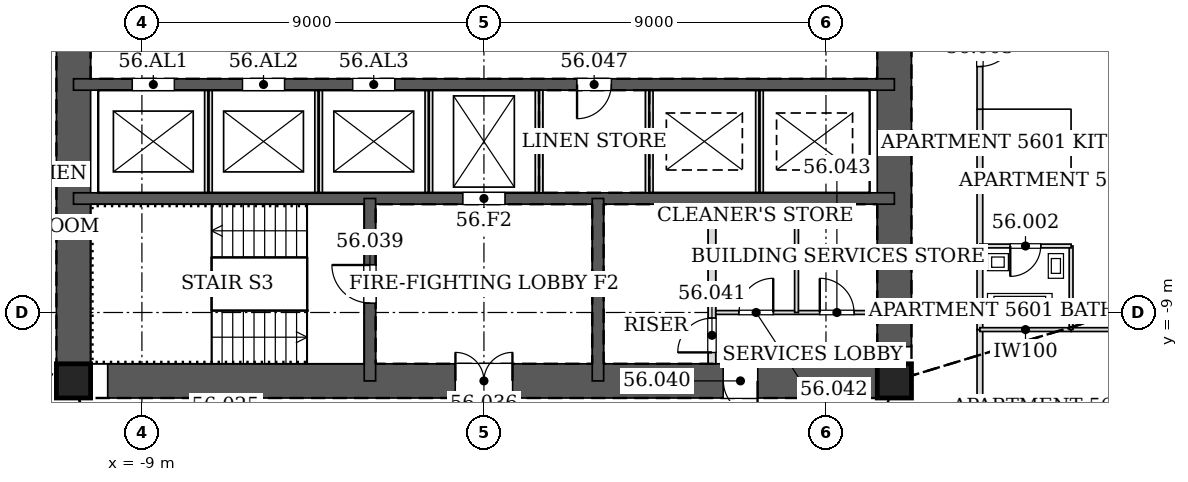
"""IFC4 building model, lengths in metres.
Left out: names, types, materials, properties, quantities, classifications, styles, units other than length and angle.
Written with IfcOpenShell. Run it as: python <this file> out.ifc"""

import sys

from ifc_helpers import new_model, si_unit, direction, frame, frame_2d, origin, origin_2d, place, context, subcontext, project, spatial, rectangle, hollow_rectangle, extrude, element, fill, save


model = new_model("IFC4")
c1 = context("Model", 3, precision=1e-05, world=origin(), true_north=direction((0.0, 1.0)))
c2 = subcontext(c1, "Body", "Model", "MODEL_VIEW")
j1 = project(units=[si_unit("LENGTHUNIT", "METRE"), si_unit("PLANEANGLEUNIT", "RADIAN")], contexts=[c1])
p1 = place(None, origin())
s1 = spatial("IfcSite", under=j1, at=p1, CompositionType="ELEMENT")
p2 = place(p1, origin())
s2 = spatial("IfcBuilding", under=s1, at=p2, CompositionType="ELEMENT")
p3 = place(p2, frame((0.0, 0.0, 238.0)))
s3 = spatial("IfcBuildingStorey", under=s2, at=p3, CompositionType="ELEMENT", Elevation=238.0)
for number, where, z_axis, x_axis in (
    (1, (-10.8, -10.8, 0.0), (0.0, 0.0, 1.0), (1.0, 0.0, 0.0)),
    (2, (10.8, -10.8, 0.0), (0.0, 0.0, 1.0), (1.0, 0.0, 0.0)),
):
    element("IfcColumn", number, at=place(p3, frame(where, z_axis=z_axis, x_axis=x_axis)), inside=s3, PredefinedType="COLUMN", context=c2, shape_type="SweptSolid", body=[
        extrude(hollow_rectangle(XDim=0.9, YDim=0.9, WallThickness=0.04, at=origin_2d()), origin(), (0.0, 0.0, 1.0), 3.4),
    ])
p4 = place(p3, frame((-10.8, -10.8, 0.0), z_axis=(0.0, 0.0, 1.0), x_axis=(1.0, 0.0, 0.0)))
e3 = element("IfcWall", 3, at=p4, inside=s3, PredefinedType="SOLIDWALL", context=c2, shape_type="SweptSolid", body=[
    extrude(rectangle(XDim=21.6, YDim=0.9, at=frame_2d((10.8, 0.0))), origin(), (0.0, 0.0, 1.0), 3.4),
])
p5 = place(p4, frame((10.05, 0.0, 0.0)))
e4 = element("IfcOpeningElement", 4, at=p5, cuts=e3, PredefinedType="OPENING", context=c2, shape_type="SweptSolid", body=[
    extrude(rectangle(XDim=1.5, YDim=2.1, at=frame_2d((0.75, 1.05))), frame((0.0, 0.46, 0.0), z_axis=(0.0, -1.0, 0.0), x_axis=(1.0, 0.0, 0.0)), (0.0, 0.0, 1.0), 0.92),
])
p6 = place(p4, frame((17.1, 0.0, 0.0)))
e5 = element("IfcOpeningElement", 5, at=p6, cuts=e3, PredefinedType="OPENING", context=c2, shape_type="SweptSolid", body=[
    extrude(rectangle(XDim=0.9, YDim=2.1, at=frame_2d((0.45, 1.05))), frame((0.0, 0.46, 0.0), z_axis=(0.0, -1.0, 0.0), x_axis=(1.0, 0.0, 0.0)), (0.0, 0.0, 1.0), 0.92),
])
p7 = place(p3, frame((10.8, -10.8, 0.0), z_axis=(0.0, 0.0, 1.0), x_axis=(0.0, 1.0, 0.0)))
e6 = element("IfcWall", 6, at=p7, inside=s3, PredefinedType="SOLIDWALL", context=c2, shape_type="SweptSolid", body=[
    extrude(rectangle(XDim=21.6, YDim=0.9, at=frame_2d((10.8, 0.0))), origin(), (0.0, 0.0, 1.0), 3.4),
])
p8 = place(p7, frame((11.7, 0.0, 0.0)))
e7 = element("IfcOpeningElement", 7, at=p8, cuts=e6, PredefinedType="OPENING", context=c2, shape_type="SweptSolid", body=[
    extrude(rectangle(XDim=1.2, YDim=2.1, at=frame_2d((0.6, 1.05))), frame((0.0, 0.46, 0.0), z_axis=(0.0, -1.0, 0.0), x_axis=(1.0, 0.0, 0.0)), (0.0, 0.0, 1.0), 0.92),
])
p9 = place(p7, frame((8.7, 0.0, 0.0)))
e8 = element("IfcOpeningElement", 8, at=p9, cuts=e6, PredefinedType="OPENING", context=c2, shape_type="SweptSolid", body=[
    extrude(rectangle(XDim=1.2, YDim=2.1, at=frame_2d((0.6, 1.05))), frame((0.0, 0.46, 0.0), z_axis=(0.0, -1.0, 0.0), x_axis=(1.0, 0.0, 0.0)), (0.0, 0.0, 1.0), 0.92),
])
p10 = place(p3, frame((-10.8, 10.8, 0.0), z_axis=(0.0, 0.0, 1.0), x_axis=(0.0, -1.0, 0.0)))
e9 = element("IfcWall", 9, at=p10, inside=s3, PredefinedType="SOLIDWALL", context=c2, shape_type="SweptSolid", body=[
    extrude(rectangle(XDim=21.6, YDim=0.9, at=frame_2d((10.8, 0.0))), origin(), (0.0, 0.0, 1.0), 3.4),
])
p11 = place(p10, frame((8.7, 0.0, 0.0)))
e10 = element("IfcOpeningElement", 10, at=p11, cuts=e9, PredefinedType="OPENING", context=c2, shape_type="SweptSolid", body=[
    extrude(rectangle(XDim=1.2, YDim=2.1, at=frame_2d((0.6, 1.05))), frame((0.0, 0.46, 0.0), z_axis=(0.0, -1.0, 0.0), x_axis=(1.0, 0.0, 0.0)), (0.0, 0.0, 1.0), 0.92),
])
p12 = place(p10, frame((11.7, 0.0, 0.0)))
e11 = element("IfcOpeningElement", 11, at=p12, cuts=e9, PredefinedType="OPENING", context=c2, shape_type="SweptSolid", body=[
    extrude(rectangle(XDim=1.2, YDim=2.1, at=frame_2d((0.6, 1.05))), frame((0.0, 0.46, 0.0), z_axis=(0.0, -1.0, 0.0), x_axis=(1.0, 0.0, 0.0)), (0.0, 0.0, 1.0), 0.92),
])
p13 = place(p3, frame((-10.8, -3.0, 0.0), z_axis=(0.0, 0.0, 1.0), x_axis=(1.0, 0.0, 0.0)))
e12 = element("IfcWall", 12, at=p13, inside=s3, PredefinedType="SOLIDWALL", context=c2, shape_type="SweptSolid", body=[
    extrude(rectangle(XDim=21.6, YDim=0.3, at=frame_2d((10.8, 0.0))), origin(), (0.0, 0.0, 1.0), 3.4),
])
p14 = place(p13, frame((13.25, 0.0, 0.0)))
e13 = element("IfcOpeningElement", 13, at=p14, cuts=e12, PredefinedType="OPENING", context=c2, shape_type="SweptSolid", body=[
    extrude(rectangle(XDim=0.9, YDim=2.1, at=frame_2d((0.45, 1.05))), frame((0.0, 0.16, 0.0), z_axis=(0.0, -1.0, 0.0), x_axis=(1.0, 0.0, 0.0)), (0.0, 0.0, 1.0), 0.32),
])
p15 = place(p13, frame((1.55, 0.0, 0.0)))
e14 = element("IfcOpeningElement", 14, at=p15, cuts=e12, PredefinedType="OPENING", context=c2, shape_type="SweptSolid", body=[
    extrude(rectangle(XDim=1.1, YDim=2.1, at=frame_2d((0.55, 1.05))), frame((0.0, 0.16, 0.0), z_axis=(0.0, -1.0, 0.0), x_axis=(1.0, 0.0, 0.0)), (0.0, 0.0, 1.0), 0.32),
])
p16 = place(p13, frame((4.45, 0.0, 0.0)))
e15 = element("IfcOpeningElement", 15, at=p16, cuts=e12, PredefinedType="OPENING", context=c2, shape_type="SweptSolid", body=[
    extrude(rectangle(XDim=1.1, YDim=2.1, at=frame_2d((0.55, 1.05))), frame((0.0, 0.16, 0.0), z_axis=(0.0, -1.0, 0.0), x_axis=(1.0, 0.0, 0.0)), (0.0, 0.0, 1.0), 0.32),
])
p17 = place(p13, frame((7.35, 0.0, 0.0)))
e16 = element("IfcOpeningElement", 16, at=p17, cuts=e12, PredefinedType="OPENING", context=c2, shape_type="SweptSolid", body=[
    extrude(rectangle(XDim=1.1, YDim=2.1, at=frame_2d((0.55, 1.05))), frame((0.0, 0.16, 0.0), z_axis=(0.0, -1.0, 0.0), x_axis=(1.0, 0.0, 0.0)), (0.0, 0.0, 1.0), 0.32),
])
p18 = place(p3, frame((-10.8, -6.0, 0.0), z_axis=(0.0, 0.0, 1.0), x_axis=(1.0, 0.0, 0.0)))
e17 = element("IfcWall", 17, at=p18, inside=s3, PredefinedType="SOLIDWALL", context=c2, shape_type="SweptSolid", body=[
    extrude(rectangle(XDim=21.6, YDim=0.3, at=frame_2d((10.8, 0.0))), origin(), (0.0, 0.0, 1.0), 3.4),
])
p19 = place(p18, frame((10.25, 0.0, 0.0)))
e18 = element("IfcOpeningElement", 18, at=p19, cuts=e17, PredefinedType="OPENING", context=c2, shape_type="SweptSolid", body=[
    extrude(rectangle(XDim=1.1, YDim=2.1, at=frame_2d((0.55, 1.05))), frame((0.0, 0.16, 0.0), z_axis=(0.0, -1.0, 0.0), x_axis=(1.0, 0.0, 0.0)), (0.0, 0.0, 1.0), 0.32),
])
p20 = place(p3, frame((-3.0, -6.0, 0.0), z_axis=(0.0, 0.0, 1.0), x_axis=(0.0, -1.0, 0.0)))
e19 = element("IfcWall", 19, at=p20, inside=s3, PredefinedType="SOLIDWALL", context=c2, shape_type="SweptSolid", body=[
    extrude(rectangle(XDim=4.8, YDim=0.3, at=frame_2d((2.4, 0.0))), origin(), (0.0, 0.0, 1.0), 3.4),
])
p21 = place(p20, frame((1.75, 0.0, 0.0)))
e20 = element("IfcOpeningElement", 20, at=p21, cuts=e19, PredefinedType="OPENING", context=c2, shape_type="SweptSolid", body=[
    extrude(rectangle(XDim=1.0, YDim=2.1, at=frame_2d((0.5, 1.05))), frame((0.0, 0.16, 0.0), z_axis=(0.0, -1.0, 0.0), x_axis=(1.0, 0.0, 0.0)), (0.0, 0.0, 1.0), 0.32),
])
p22 = place(p3, frame((3.0, -6.0, 0.0), z_axis=(0.0, 0.0, 1.0), x_axis=(0.0, -1.0, 0.0)))
e21 = element("IfcWall", 21, at=p22, inside=s3, PredefinedType="SOLIDWALL", context=c2, shape_type="SweptSolid", body=[
    extrude(rectangle(XDim=4.8, YDim=0.3, at=frame_2d((2.4, 0.0))), origin(), (0.0, 0.0, 1.0), 3.4),
])
p23 = place(p3, frame((13.05, -13.05, 0.0), z_axis=(0.0, 0.0, 1.0), x_axis=(0.0, 1.0, 0.0)))
e22 = element("IfcWall", 22, at=p23, inside=s3, PredefinedType="PARTITIONING", context=c2, shape_type="SweptSolid", body=[
    extrude(rectangle(XDim=3.601, YDim=0.15, at=frame_2d((1.801, 0.0))), origin(), (0.0, 0.0, 1.0), 2.349),
])
p24 = place(p3, frame((13.05, -9.451, 0.0), z_axis=(0.0, 0.0, 1.0), x_axis=(0.0, 1.0, 0.0)))
e23 = element("IfcWall", 23, at=p24, inside=s3, PredefinedType="PARTITIONING", context=c2, shape_type="SweptSolid", body=[
    extrude(rectangle(XDim=2.202, YDim=0.15, at=frame_2d((1.101, 0.0))), origin(), (0.0, 0.0, 1.0), 2.662),
])
for number, where, z_axis, x_axis in (
    (24, (13.05, -5.451, 0.0), (0.0, 0.0, 1.0), (0.0, 1.0, 0.0)),
    (25, (13.05, -7.251, 0.0), (0.0, 0.0, 1.0), (0.0, 1.0, 0.0)),
):
    element("IfcWall", number, at=place(p3, frame(where, z_axis=z_axis, x_axis=x_axis)), inside=s3, PredefinedType="PARTITIONING", context=c2, shape_type="SweptSolid", body=[
        extrude(rectangle(XDim=1.802, YDim=0.15, at=frame_2d((0.901, 0.0))), origin(), (0.0, 0.0, 1.0), 2.662),
    ])
p25 = place(p3, frame((13.05, -3.651, 0.0), z_axis=(0.0, 0.0, 1.0), x_axis=(0.0, 1.0, 0.0)))
e26 = element("IfcWall", 26, at=p25, inside=s3, PredefinedType="PARTITIONING", context=c2, shape_type="SweptSolid", body=[
    extrude(rectangle(XDim=3.202, YDim=0.15, at=frame_2d((1.601, 0.0))), origin(), (0.0, 0.0, 1.0), 2.662),
])
p26 = place(p25, frame((1.126, 0.0, 0.0)))
e27 = element("IfcOpeningElement", 27, at=p26, cuts=e26, PredefinedType="OPENING", context=c2, shape_type="SweptSolid", body=[
    extrude(rectangle(XDim=0.95, YDim=2.1, at=frame_2d((0.475, 1.05))), frame((0.0, 0.085, 0.0), z_axis=(0.0, -1.0, 0.0), x_axis=(1.0, 0.0, 0.0)), (0.0, 0.0, 1.0), 0.17),
])
p27 = place(p3, frame((15.451, -9.45, 0.0), z_axis=(0.0, 0.0, 1.0), x_axis=(-1.0, 0.0, 0.0)))
e28 = element("IfcWall", 28, at=p27, inside=s3, PredefinedType="PARTITIONING", context=c2, shape_type="SweptSolid", body=[
    extrude(rectangle(XDim=2.401, YDim=0.1, at=frame_2d((1.2, 0.0))), origin(), (0.0, 0.0, 1.0), 2.349),
])
p28 = place(p3, frame((20.625, -9.45, 0.0), z_axis=(0.0, 0.0, 1.0), x_axis=(-1.0, 0.0, 0.0)))
e29 = element("IfcWall", 29, at=p28, inside=s3, PredefinedType="PARTITIONING", context=c2, shape_type="SweptSolid", body=[
    extrude(rectangle(XDim=5.177, YDim=0.1, at=frame_2d((2.588, 0.0))), origin(), (0.0, 0.0, 1.0), 2.349),
])
p29 = place(p28, frame((1.966, 0.0, 0.0)))
e30 = element("IfcOpeningElement", 30, at=p29, cuts=e29, PredefinedType="OPENING", context=c2, shape_type="SweptSolid", body=[
    extrude(rectangle(XDim=0.85, YDim=2.1, at=frame_2d((0.425, 1.05))), frame((0.0, 0.06, 0.0), z_axis=(0.0, -1.0, 0.0), x_axis=(1.0, 0.0, 0.0)), (0.0, 0.0, 1.0), 0.12),
])
p30 = place(p3, frame((15.45, -9.45, 0.0), z_axis=(0.0, 0.0, 1.0), x_axis=(0.0, 1.0, 0.0)))
e31 = element("IfcWall", 31, at=p30, inside=s3, PredefinedType="PARTITIONING", context=c2, shape_type="SweptSolid", body=[
    extrude(rectangle(XDim=2.2, YDim=0.1, at=frame_2d((1.1, 0.0))), origin(), (0.0, 0.0, 1.0), 2.349),
])
p31 = place(p3, frame((15.45, -7.25, 0.0), z_axis=(0.0, 0.0, 1.0), x_axis=(-1.0, 0.0, 0.0)))
e32 = element("IfcWall", 32, at=p31, inside=s3, PredefinedType="PARTITIONING", context=c2, shape_type="SweptSolid", body=[
    extrude(rectangle(XDim=2.4, YDim=0.1, at=frame_2d((1.2, 0.0))), origin(), (0.0, 0.0, 1.0), 2.662),
])
p32 = place(p31, frame((0.8, 0.0, 0.0)))
e33 = element("IfcOpeningElement", 33, at=p32, cuts=e32, PredefinedType="OPENING", context=c2, shape_type="SweptSolid", body=[
    extrude(rectangle(XDim=0.8, YDim=2.1, at=frame_2d((0.4, 1.05))), frame((0.0, 0.06, 0.0), z_axis=(0.0, -1.0, 0.0), x_axis=(1.0, 0.0, 0.0)), (0.0, 0.0, 1.0), 0.12),
])
for number, where, z_axis, x_axis in (
    (34, (-7.25, -5.85, 0.0), (0.0, 0.0, 1.0), (0.0, 1.0, 0.0)),
    (35, (-4.35, -5.85, 0.0), (0.0, 0.0, 1.0), (0.0, 1.0, 0.0)),
    (36, (-1.45, -5.85, 0.0), (0.0, 0.0, 1.0), (0.0, 1.0, 0.0)),
):
    element("IfcWall", number, at=place(p3, frame(where, z_axis=z_axis, x_axis=x_axis)), inside=s3, PredefinedType="PARTITIONING", context=c2, shape_type="SweptSolid", body=[
        extrude(rectangle(XDim=2.7, YDim=0.2, at=frame_2d((1.35, 0.0))), origin(), (0.0, 0.0, 1.0), 3.4),
    ])
for number, where, z_axis, x_axis in (
    (37, (1.45, -5.85, 0.0), (0.0, 0.0, 1.0), (0.0, 1.0, 0.0)),
    (38, (4.35, -5.85, 0.0), (0.0, 0.0, 1.0), (0.0, 1.0, 0.0)),
):
    element("IfcWall", number, at=place(p3, frame(where, z_axis=z_axis, x_axis=x_axis)), inside=s3, PredefinedType="PARTITIONING", context=c2, shape_type="SweptSolid", body=[
        extrude(rectangle(XDim=2.7, YDim=0.2, at=frame_2d((1.35, 0.0))), origin(), (0.0, 0.0, 1.0), 3.2),
    ])
p33 = place(p3, frame((7.25, -5.85, 0.0), z_axis=(0.0, 0.0, 1.0), x_axis=(0.0, 1.0, 0.0)))
e39 = element("IfcWall", 39, at=p33, inside=s3, PredefinedType="PARTITIONING", context=c2, shape_type="SweptSolid", body=[
    extrude(rectangle(XDim=2.7, YDim=0.2, at=frame_2d((1.35, 0.0))), origin(), (0.0, 0.0, 1.0), 3.4),
])
p34 = place(p3, frame((6.0, -10.35, 0.0), z_axis=(0.0, 0.0, 1.0), x_axis=(0.0, 1.0, 0.0)))
e40 = element("IfcWall", 40, at=p34, inside=s3, PredefinedType="PARTITIONING", context=c2, shape_type="SweptSolid", body=[
    extrude(rectangle(XDim=4.2, YDim=0.2, at=frame_2d((2.1, 0.0))), origin(), (0.0, 0.0, 1.0), 3.2),
])
p35 = place(p34, frame((0.3, 0.0, 0.0)))
e41 = element("IfcOpeningElement", 41, at=p35, cuts=e40, PredefinedType="OPENING", context=c2, shape_type="SweptSolid", body=[
    extrude(rectangle(XDim=0.9, YDim=2.1, at=frame_2d((0.45, 1.05))), frame((0.0, 0.11, 0.0), z_axis=(0.0, -1.0, 0.0), x_axis=(1.0, 0.0, 0.0)), (0.0, 0.0, 1.0), 0.22),
])
p36 = place(p3, frame((6.1, -9.0, 0.0), z_axis=(0.0, 0.0, 1.0), x_axis=(1.0, 0.0, 0.0)))
e42 = element("IfcWall", 42, at=p36, inside=s3, PredefinedType="PARTITIONING", context=c2, shape_type="SweptSolid", body=[
    extrude(rectangle(XDim=4.25, YDim=0.1, at=frame_2d((2.125, 0.0))), origin(), (0.0, 0.0, 1.0), 3.2),
])
p37 = place(p36, frame((0.613, 0.0, 0.0)))
e43 = element("IfcOpeningElement", 43, at=p37, cuts=e42, PredefinedType="OPENING", context=c2, shape_type="SweptSolid", body=[
    extrude(rectangle(XDim=0.9, YDim=2.1, at=frame_2d((0.45, 1.05))), frame((0.0, 0.06, 0.0), z_axis=(0.0, -1.0, 0.0), x_axis=(1.0, 0.0, 0.0)), (0.0, 0.0, 1.0), 0.12),
])
p38 = place(p36, frame((2.738, 0.0, 0.0)))
e44 = element("IfcOpeningElement", 44, at=p38, cuts=e42, PredefinedType="OPENING", context=c2, shape_type="SweptSolid", body=[
    extrude(rectangle(XDim=0.9, YDim=2.1, at=frame_2d((0.45, 1.05))), frame((0.0, 0.06, 0.0), z_axis=(0.0, -1.0, 0.0), x_axis=(1.0, 0.0, 0.0)), (0.0, 0.0, 1.0), 0.12),
])
p39 = place(p3, frame((8.225, -9.0, 0.0), z_axis=(0.0, 0.0, 1.0), x_axis=(0.0, 1.0, 0.0)))
e45 = element("IfcWall", 45, at=p39, inside=s3, PredefinedType="PARTITIONING", context=c2, shape_type="SweptSolid", body=[
    extrude(rectangle(XDim=2.85, YDim=0.1, at=frame_2d((1.425, 0.0))), origin(), (0.0, 0.0, 1.0), 3.2),
])
p40 = place(p32, origin())
e46 = element("IfcDoor", 46, at=p40, inside=s3, OperationType="SINGLE_SWING_RIGHT", PredefinedType="DOOR", context=c2, shape_type="SweptSolid", body=[
    extrude(rectangle(XDim=0.8, YDim=2.1, at=frame_2d((0.4, 1.05))), frame((0.0, 0.025, 0.0), z_axis=(0.0, -1.0, 0.0), x_axis=(1.0, 0.0, 0.0)), (0.0, 0.0, 1.0), 0.05),
])
fill(e33, e46)
p41 = place(p26, frame((0.95, 0.0, 0.0), z_axis=(0.0, 0.0, 1.0), x_axis=(-1.0, 0.0, 0.0)))
e47 = element("IfcDoor", 47, at=p41, inside=s3, OperationType="SINGLE_SWING_LEFT", PredefinedType="DOOR", context=c2, shape_type="SweptSolid", body=[
    extrude(rectangle(XDim=0.95, YDim=2.1, at=frame_2d((0.475, 1.05))), frame((0.0, 0.025, 0.0), z_axis=(0.0, -1.0, 0.0), x_axis=(1.0, 0.0, 0.0)), (0.0, 0.0, 1.0), 0.05),
])
fill(e27, e47)
p42 = place(p5, origin())
e48 = element("IfcDoor", 48, at=p42, inside=s3, OperationType="DOUBLE_DOOR_SINGLE_SWING", PredefinedType="DOOR", context=c2, shape_type="SweptSolid", body=[
    extrude(rectangle(XDim=1.5, YDim=2.1, at=frame_2d((0.75, 1.05))), frame((0.0, 0.025, 0.0), z_axis=(0.0, -1.0, 0.0), x_axis=(1.0, 0.0, 0.0)), (0.0, 0.0, 1.0), 0.05),
])
fill(e4, e48)
p43 = place(p21, frame((1.0, 0.0, 0.0), z_axis=(0.0, 0.0, 1.0), x_axis=(-1.0, 0.0, 0.0)))
e49 = element("IfcDoor", 49, at=p43, inside=s3, OperationType="SINGLE_SWING_RIGHT", PredefinedType="DOOR", context=c2, shape_type="SweptSolid", body=[
    extrude(rectangle(XDim=1.0, YDim=2.1, at=frame_2d((0.5, 1.05))), frame((0.0, 0.025, 0.0), z_axis=(0.0, -1.0, 0.0), x_axis=(1.0, 0.0, 0.0)), (0.0, 0.0, 1.0), 0.05),
])
fill(e20, e49)
p44 = place(p6, frame((0.9, 0.0, 0.0), z_axis=(0.0, 0.0, 1.0), x_axis=(-1.0, 0.0, 0.0)))
e50 = element("IfcDoor", 50, at=p44, inside=s3, OperationType="SINGLE_SWING_LEFT", PredefinedType="DOOR", context=c2, shape_type="SweptSolid", body=[
    extrude(rectangle(XDim=0.9, YDim=2.1, at=frame_2d((0.45, 1.05))), frame((0.0, 0.025, 0.0), z_axis=(0.0, -1.0, 0.0), x_axis=(1.0, 0.0, 0.0)), (0.0, 0.0, 1.0), 0.05),
])
fill(e5, e50)
p45 = place(p35, origin())
e51 = element("IfcDoor", 51, at=p45, inside=s3, OperationType="SINGLE_SWING_LEFT", PredefinedType="DOOR", context=c2, shape_type="SweptSolid", body=[
    extrude(rectangle(XDim=0.9, YDim=2.1, at=frame_2d((0.45, 1.05))), frame((0.0, 0.025, 0.0), z_axis=(0.0, -1.0, 0.0), x_axis=(1.0, 0.0, 0.0)), (0.0, 0.0, 1.0), 0.05),
])
fill(e41, e51)
p46 = place(p37, origin())
e52 = element("IfcDoor", 52, at=p46, inside=s3, OperationType="SINGLE_SWING_RIGHT", PredefinedType="DOOR", context=c2, shape_type="SweptSolid", body=[
    extrude(rectangle(XDim=0.9, YDim=2.1, at=frame_2d((0.45, 1.05))), frame((0.0, 0.025, 0.0), z_axis=(0.0, -1.0, 0.0), x_axis=(1.0, 0.0, 0.0)), (0.0, 0.0, 1.0), 0.05),
])
fill(e43, e52)
p47 = place(p38, origin())
e53 = element("IfcDoor", 53, at=p47, inside=s3, OperationType="SINGLE_SWING_LEFT", PredefinedType="DOOR", context=c2, shape_type="SweptSolid", body=[
    extrude(rectangle(XDim=0.9, YDim=2.1, at=frame_2d((0.45, 1.05))), frame((0.0, 0.025, 0.0), z_axis=(0.0, -1.0, 0.0), x_axis=(1.0, 0.0, 0.0)), (0.0, 0.0, 1.0), 0.05),
])
fill(e44, e53)
p48 = place(p14, frame((0.9, 0.0, 0.0), z_axis=(0.0, 0.0, 1.0), x_axis=(-1.0, 0.0, 0.0)))
e54 = element("IfcDoor", 54, at=p48, inside=s3, OperationType="SINGLE_SWING_RIGHT", PredefinedType="DOOR", context=c2, shape_type="SweptSolid", body=[
    extrude(rectangle(XDim=0.9, YDim=2.1, at=frame_2d((0.45, 1.05))), frame((0.0, 0.025, 0.0), z_axis=(0.0, -1.0, 0.0), x_axis=(1.0, 0.0, 0.0)), (0.0, 0.0, 1.0), 0.05),
])
fill(e13, e54)
p49 = place(p19, origin())
e55 = element("IfcDoor", 55, at=p49, inside=s3, OperationType="DOUBLE_DOOR_SLIDING", PredefinedType="DOOR", context=c2, shape_type="SweptSolid", body=[
    extrude(rectangle(XDim=1.1, YDim=2.1, at=frame_2d((0.55, 1.05))), frame((0.0, 0.025, 0.0), z_axis=(0.0, -1.0, 0.0), x_axis=(1.0, 0.0, 0.0)), (0.0, 0.0, 1.0), 0.05),
])
fill(e18, e55)
p50 = place(p15, origin())
e56 = element("IfcDoor", 56, at=p50, inside=s3, OperationType="DOUBLE_DOOR_SLIDING", PredefinedType="DOOR", context=c2, shape_type="SweptSolid", body=[
    extrude(rectangle(XDim=1.1, YDim=2.1, at=frame_2d((0.55, 1.05))), frame((0.0, 0.025, 0.0), z_axis=(0.0, -1.0, 0.0), x_axis=(1.0, 0.0, 0.0)), (0.0, 0.0, 1.0), 0.05),
])
fill(e14, e56)
p51 = place(p16, origin())
e57 = element("IfcDoor", 57, at=p51, inside=s3, OperationType="DOUBLE_DOOR_SLIDING", PredefinedType="DOOR", context=c2, shape_type="SweptSolid", body=[
    extrude(rectangle(XDim=1.1, YDim=2.1, at=frame_2d((0.55, 1.05))), frame((0.0, 0.025, 0.0), z_axis=(0.0, -1.0, 0.0), x_axis=(1.0, 0.0, 0.0)), (0.0, 0.0, 1.0), 0.05),
])
fill(e15, e57)
p52 = place(p17, origin())
e58 = element("IfcDoor", 58, at=p52, inside=s3, OperationType="DOUBLE_DOOR_SLIDING", PredefinedType="DOOR", context=c2, shape_type="SweptSolid", body=[
    extrude(rectangle(XDim=1.1, YDim=2.1, at=frame_2d((0.55, 1.05))), frame((0.0, 0.025, 0.0), z_axis=(0.0, -1.0, 0.0), x_axis=(1.0, 0.0, 0.0)), (0.0, 0.0, 1.0), 0.05),
])
fill(e16, e58)
save(model, sys.argv[1])
